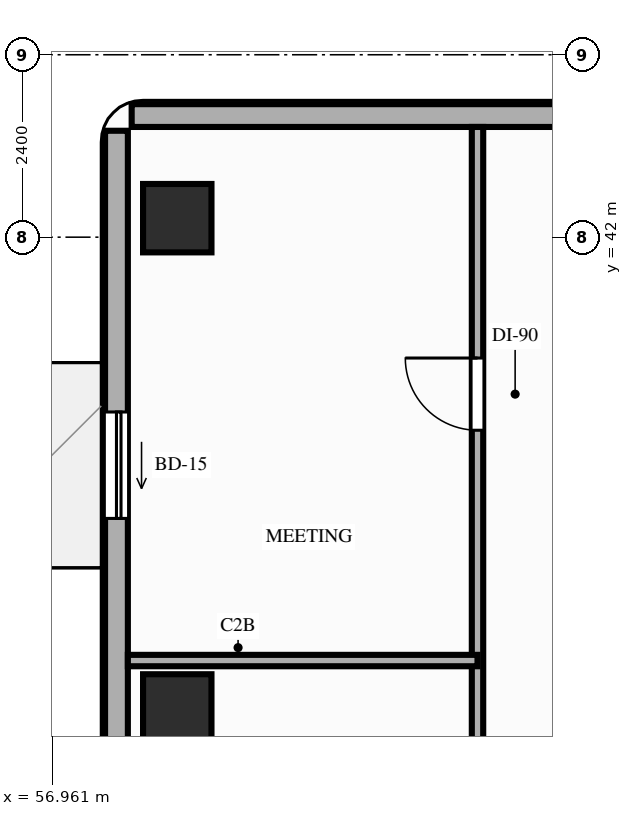
"""IFC4 building model, lengths in metres.
Left out: names, types, materials, properties, quantities, classifications, styles, units other than length and angle.
Written with IfcOpenShell. Run it as: python <this file> out.ifc"""

import sys

from ifc_helpers import new_model, si_unit, direction, frame, frame_2d, origin, origin_2d, place, context, subcontext, project, spatial, rectangle, extrude, element, fill, save


model = new_model("IFC4")
c1 = context("Model", 3, precision=1e-05, world=origin(), true_north=direction((0.0, 1.0)))
c2 = subcontext(c1, "Body", "Model", "MODEL_VIEW")
j1 = project(units=[si_unit("LENGTHUNIT", "METRE"), si_unit("PLANEANGLEUNIT", "RADIAN")], contexts=[c1])
p1 = place(None, origin())
s1 = spatial("IfcSite", under=j1, at=p1, CompositionType="ELEMENT")
p2 = place(p1, origin())
s2 = spatial("IfcBuilding", under=s1, at=p2, CompositionType="ELEMENT")
p3 = place(p2, frame((0.0, 0.0, 75.6)))
s3 = spatial("IfcBuildingStorey", under=s2, at=p3, CompositionType="ELEMENT", Elevation=75.6)
for number, where, z_axis, x_axis in (
    (1, (58.6, 35.8, 0.0), (0.0, 0.0, 1.0), (1.0, 0.0, 0.0)),
    (2, (58.6, 42.25, 0.0), (0.0, 0.0, 1.0), (1.0, 0.0, 0.0)),
):
    element("IfcColumn", number, at=place(p3, frame(where, z_axis=z_axis, x_axis=x_axis)), inside=s3, PredefinedType="COLUMN", context=c2, shape_type="SweptSolid", body=[
        extrude(rectangle(XDim=0.9, YDim=0.9, at=origin_2d()), origin(), (0.0, 0.0, 1.0), 3.8),
    ])
p4 = place(p3, frame((57.8, 43.4, 0.0), z_axis=(0.0, 0.0, 1.0), x_axis=(0.0, -1.0, 0.0)))
e3 = element("IfcWall", 3, at=p4, inside=s3, PredefinedType="STANDARD", context=c2, shape_type="SweptSolid", body=[
    extrude(rectangle(XDim=22.6, YDim=0.3, at=frame_2d((11.3, 0.0))), origin(), (0.0, 0.0, 1.0), 3.14),
])
p5 = place(p4, frame((3.7, 0.0, 0.0)))
e4 = element("IfcOpeningElement", 4, at=p5, cuts=e3, PredefinedType="OPENING", context=c2, shape_type="SweptSolid", body=[
    extrude(rectangle(XDim=1.4, YDim=2.1, at=frame_2d((0.7, 1.05))), frame((0.0, 0.16, 0.0), z_axis=(0.0, -1.0, 0.0), x_axis=(1.0, 0.0, 0.0)), (0.0, 0.0, 1.0), 0.32),
])
p6 = place(p4, frame((10.3, 0.0, 0.85)))
e5 = element("IfcOpeningElement", 5, at=p6, cuts=e3, PredefinedType="OPENING", context=c2, shape_type="SweptSolid", body=[
    extrude(rectangle(XDim=1.6, YDim=1.7, at=frame_2d((0.8, 0.85))), frame((0.0, 0.16, 0.0), z_axis=(0.0, -1.0, 0.0), x_axis=(1.0, 0.0, 0.0)), (0.0, 0.0, 1.0), 0.32),
])
p7 = place(p3, frame((72.8, 43.6, 0.0), z_axis=(0.0, 0.0, 1.0), x_axis=(-1.0, 0.0, 0.0)))
e6 = element("IfcWall", 6, at=p7, inside=s3, PredefinedType="STANDARD", context=c2, shape_type="SweptSolid", body=[
    extrude(rectangle(XDim=14.8, YDim=0.3, at=frame_2d((7.4, 0.0))), origin(), (0.0, 0.0, 1.0), 3.56),
])
p8 = place(p3, frame((62.55, 20.75, 0.0), z_axis=(0.0, 0.0, 1.0), x_axis=(0.0, 1.0, 0.0)))
e7 = element("IfcWall", 7, at=p8, inside=s3, PredefinedType="PARTITIONING", context=c2, shape_type="SweptSolid", body=[
    extrude(rectangle(XDim=22.7, YDim=0.15, at=frame_2d((11.35, 0.0))), origin(), (0.0, 0.0, 1.0), 3.14),
])
p9 = place(p8, frame((1.05, 0.0, 0.0)))
e8 = element("IfcOpeningElement", 8, at=p9, cuts=e7, PredefinedType="OPENING", context=c2, shape_type="SweptSolid", body=[
    extrude(rectangle(XDim=0.85, YDim=2.1, at=frame_2d((0.425, 1.05))), frame((0.0, 0.085, 0.0), z_axis=(0.0, -1.0, 0.0), x_axis=(1.0, 0.0, 0.0)), (0.0, 0.0, 1.0), 0.17),
])
p10 = place(p8, frame((3.43, 0.0, 0.0)))
e9 = element("IfcOpeningElement", 9, at=p10, cuts=e7, PredefinedType="OPENING", context=c2, shape_type="SweptSolid", body=[
    extrude(rectangle(XDim=0.95, YDim=2.1, at=frame_2d((0.475, 1.05))), frame((0.0, 0.085, 0.0), z_axis=(0.0, -1.0, 0.0), x_axis=(1.0, 0.0, 0.0)), (0.0, 0.0, 1.0), 0.17),
])
p11 = place(p8, frame((8.15, 0.0, 0.0)))
e10 = element("IfcOpeningElement", 10, at=p11, cuts=e7, PredefinedType="OPENING", context=c2, shape_type="SweptSolid", body=[
    extrude(rectangle(XDim=0.95, YDim=2.15, at=frame_2d((0.475, 1.075))), frame((0.0, 0.085, 0.0), z_axis=(0.0, -1.0, 0.0), x_axis=(1.0, 0.0, 0.0)), (0.0, 0.0, 1.0), 0.17),
])
p12 = place(p8, frame((12.14, 0.0, 0.0)))
e11 = element("IfcOpeningElement", 11, at=p12, cuts=e7, PredefinedType="OPENING", context=c2, shape_type="SweptSolid", body=[
    extrude(rectangle(XDim=0.95, YDim=2.15, at=frame_2d((0.475, 1.075))), frame((0.0, 0.085, 0.0), z_axis=(0.0, -1.0, 0.0), x_axis=(1.0, 0.0, 0.0)), (0.0, 0.0, 1.0), 0.17),
])
p13 = place(p8, frame((18.71, 0.0, 0.0)))
e12 = element("IfcOpeningElement", 12, at=p13, cuts=e7, PredefinedType="OPENING", context=c2, shape_type="SweptSolid", body=[
    extrude(rectangle(XDim=0.95, YDim=2.15, at=frame_2d((0.475, 1.075))), frame((0.0, 0.085, 0.0), z_axis=(0.0, -1.0, 0.0), x_axis=(1.0, 0.0, 0.0)), (0.0, 0.0, 1.0), 0.17),
])
p14 = place(p3, frame((57.95, 36.43, 0.0), z_axis=(0.0, 0.0, 1.0), x_axis=(1.0, 0.0, 0.0)))
e13 = element("IfcWall", 13, at=p14, inside=s3, PredefinedType="PARTITIONING", context=c2, shape_type="SweptSolid", body=[
    extrude(rectangle(XDim=4.6, YDim=0.15, at=frame_2d((2.3, 0.0))), origin(), (0.0, 0.0, 1.0), 3.14),
])
p15 = place(p5, origin())
e14 = element("IfcDoor", 14, at=p15, inside=s3, OperationType="SLIDING_TO_RIGHT", PredefinedType="DOOR", context=c2, shape_type="SweptSolid", body=[
    extrude(rectangle(XDim=1.4, YDim=2.1, at=frame_2d((0.7, 1.05))), frame((0.0, 0.025, 0.0), z_axis=(0.0, -1.0, 0.0), x_axis=(1.0, 0.0, 0.0)), (0.0, 0.0, 1.0), 0.05),
])
fill(e4, e14)
p16 = place(p13, origin())
e15 = element("IfcDoor", 15, at=p16, inside=s3, OperationType="SINGLE_SWING_RIGHT", PredefinedType="DOOR", context=c2, shape_type="SweptSolid", body=[
    extrude(rectangle(XDim=0.95, YDim=2.15, at=frame_2d((0.475, 1.075))), frame((0.0, 0.025, 0.0), z_axis=(0.0, -1.0, 0.0), x_axis=(1.0, 0.0, 0.0)), (0.0, 0.0, 1.0), 0.05),
])
fill(e12, e15)
save(model, sys.argv[1])
